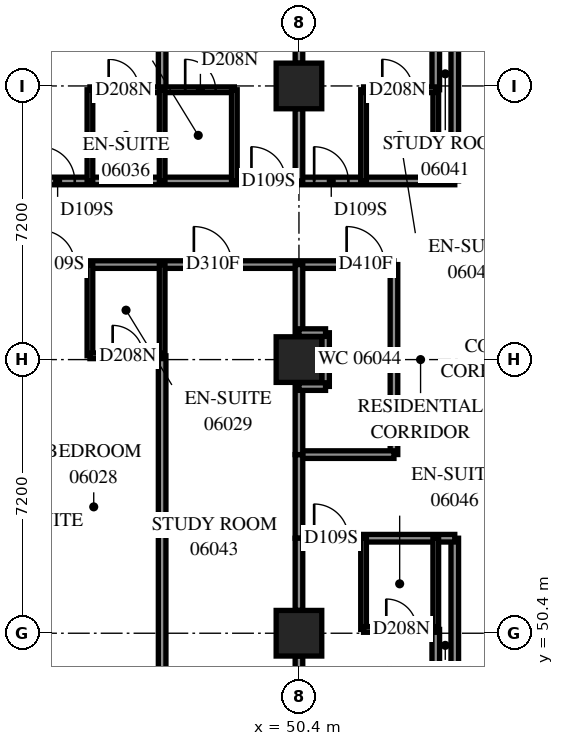
"""IFC4 building model, lengths in metres.
Left out: names, types, materials, properties, quantities, classifications, styles, units other than length and angle.
Written with IfcOpenShell. Run it as: python <this file> out.ifc"""

import sys

from ifc_helpers import new_model, si_unit, direction, frame, frame_2d, origin, origin_2d, place, context, subcontext, project, spatial, rectangle, extrude, element, fill, save


model = new_model("IFC4")
c1 = context("Model", 3, precision=1e-05, world=origin(), true_north=direction((0.0, 1.0)))
c2 = subcontext(c1, "Body", "Model", "MODEL_VIEW")
j1 = project(units=[si_unit("LENGTHUNIT", "METRE"), si_unit("PLANEANGLEUNIT", "RADIAN")], contexts=[c1])
p1 = place(None, origin())
s1 = spatial("IfcSite", under=j1, at=p1, CompositionType="ELEMENT")
p2 = place(p1, origin())
s2 = spatial("IfcBuilding", under=s1, at=p2, CompositionType="ELEMENT")
p3 = place(p2, frame((0.0, 0.0, 27.0)))
s3 = spatial("IfcBuildingStorey", under=s2, at=p3, CompositionType="ELEMENT", Elevation=27.0)
for number, where, z_axis, x_axis in (
    (1, (50.4, 50.4, 0.0), (0.0, 0.0, 1.0), (1.0, 0.0, 0.0)),
    (2, (50.4, 57.6, 0.0), (0.0, 0.0, 1.0), (1.0, 0.0, 0.0)),
    (3, (50.4, 64.8, 0.0), (0.0, 0.0, 1.0), (1.0, 0.0, 0.0)),
):
    element("IfcColumn", number, at=place(p3, frame(where, z_axis=z_axis, x_axis=x_axis)), inside=s3, PredefinedType="COLUMN", context=c2, shape_type="SweptSolid", body=[
        extrude(rectangle(XDim=1.2, YDim=1.2, at=origin_2d()), origin(), (0.0, 0.0, 1.0), 3.1),
    ])
p4 = place(p3, frame((28.8, 60.1, 0.0), z_axis=(0.0, 0.0, 1.0), x_axis=(1.0, 0.0, 0.0)))
e4 = element("IfcWall", 4, at=p4, inside=s3, PredefinedType="PARTITIONING", context=c2, shape_type="SweptSolid", body=[
    extrude(rectangle(XDim=24.1, YDim=0.2, at=frame_2d((12.05, 0.0))), origin(), (0.0, 0.0, 1.0), 3.1),
])
p5 = place(p4, frame((4.125, 0.0, 0.0)))
e5 = element("IfcOpeningElement", 5, at=p5, cuts=e4, PredefinedType="OPENING", context=c2, shape_type="SweptSolid", body=[
    extrude(rectangle(XDim=1.0, YDim=2.1, at=frame_2d((0.5, 1.05))), frame((0.0, 0.11, 0.0), z_axis=(0.0, -1.0, 0.0), x_axis=(1.0, 0.0, 0.0)), (0.0, 0.0, 1.0), 0.22),
])
p6 = place(p4, frame((11.62, 0.0, 0.0)))
e6 = element("IfcOpeningElement", 6, at=p6, cuts=e4, PredefinedType="OPENING", context=c2, shape_type="SweptSolid", body=[
    extrude(rectangle(XDim=0.9, YDim=2.1, at=frame_2d((0.45, 1.05))), frame((0.0, 0.11, 0.0), z_axis=(0.0, -1.0, 0.0), x_axis=(1.0, 0.0, 0.0)), (0.0, 0.0, 1.0), 0.22),
])
p7 = place(p4, frame((14.8, 0.0, 0.0)))
e7 = element("IfcOpeningElement", 7, at=p7, cuts=e4, PredefinedType="OPENING", context=c2, shape_type="SweptSolid", body=[
    extrude(rectangle(XDim=0.9, YDim=2.1, at=frame_2d((0.45, 1.05))), frame((0.0, 0.11, 0.0), z_axis=(0.0, -1.0, 0.0), x_axis=(1.0, 0.0, 0.0)), (0.0, 0.0, 1.0), 0.22),
])
p8 = place(p4, frame((18.835, 0.0, 0.0)))
e8 = element("IfcOpeningElement", 8, at=p8, cuts=e4, PredefinedType="OPENING", context=c2, shape_type="SweptSolid", body=[
    extrude(rectangle(XDim=1.0, YDim=2.1, at=frame_2d((0.5, 1.05))), frame((0.0, 0.11, 0.0), z_axis=(0.0, -1.0, 0.0), x_axis=(1.0, 0.0, 0.0)), (0.0, 0.0, 1.0), 0.22),
])
p9 = place(p4, frame((22.854, 0.0, 0.0)))
e9 = element("IfcOpeningElement", 9, at=p9, cuts=e4, PredefinedType="OPENING", context=c2, shape_type="SweptSolid", body=[
    extrude(rectangle(XDim=1.0, YDim=2.1, at=frame_2d((0.5, 1.05))), frame((0.0, 0.11, 0.0), z_axis=(0.0, -1.0, 0.0), x_axis=(1.0, 0.0, 0.0)), (0.0, 0.0, 1.0), 0.22),
])
p10 = place(p3, frame((33.502, 62.3, 0.0), z_axis=(0.0, 0.0, 1.0), x_axis=(1.0, 0.0, 0.0)))
e10 = element("IfcWall", 10, at=p10, inside=s3, PredefinedType="PARTITIONING", context=c2, shape_type="SweptSolid", body=[
    extrude(rectangle(XDim=20.998, YDim=0.2, at=frame_2d((10.499, 0.0))), origin(), (0.0, 0.0, 1.0), 3.1),
])
p11 = place(p10, frame((2.898, 0.0, 0.0)))
e11 = element("IfcOpeningElement", 11, at=p11, cuts=e10, PredefinedType="OPENING", context=c2, shape_type="SweptSolid", body=[
    extrude(rectangle(XDim=0.9, YDim=2.1, at=frame_2d((0.45, 1.05))), frame((0.0, 0.11, 0.0), z_axis=(0.0, -1.0, 0.0), x_axis=(1.0, 0.0, 0.0)), (0.0, 0.0, 1.0), 0.22),
])
p12 = place(p10, frame((8.448, 0.0, 0.0)))
e12 = element("IfcOpeningElement", 12, at=p12, cuts=e10, PredefinedType="OPENING", context=c2, shape_type="SweptSolid", body=[
    extrude(rectangle(XDim=0.9, YDim=2.1, at=frame_2d((0.45, 1.05))), frame((0.0, 0.11, 0.0), z_axis=(0.0, -1.0, 0.0), x_axis=(1.0, 0.0, 0.0)), (0.0, 0.0, 1.0), 0.22),
])
p13 = place(p10, frame((10.098, 0.0, 0.0)))
e13 = element("IfcOpeningElement", 13, at=p13, cuts=e10, PredefinedType="OPENING", context=c2, shape_type="SweptSolid", body=[
    extrude(rectangle(XDim=0.9, YDim=2.1, at=frame_2d((0.45, 1.05))), frame((0.0, 0.11, 0.0), z_axis=(0.0, -1.0, 0.0), x_axis=(1.0, 0.0, 0.0)), (0.0, 0.0, 1.0), 0.22),
])
p14 = place(p10, frame((15.648, 0.0, 0.0)))
e14 = element("IfcOpeningElement", 14, at=p14, cuts=e10, PredefinedType="OPENING", context=c2, shape_type="SweptSolid", body=[
    extrude(rectangle(XDim=0.9, YDim=2.1, at=frame_2d((0.45, 1.05))), frame((0.0, 0.11, 0.0), z_axis=(0.0, -1.0, 0.0), x_axis=(1.0, 0.0, 0.0)), (0.0, 0.0, 1.0), 0.22),
])
p15 = place(p10, frame((17.298, 0.0, 0.0)))
e15 = element("IfcOpeningElement", 15, at=p15, cuts=e10, PredefinedType="OPENING", context=c2, shape_type="SweptSolid", body=[
    extrude(rectangle(XDim=0.9, YDim=2.1, at=frame_2d((0.45, 1.05))), frame((0.0, 0.11, 0.0), z_axis=(0.0, -1.0, 0.0), x_axis=(1.0, 0.0, 0.0)), (0.0, 0.0, 1.0), 0.22),
])
p16 = place(p3, frame((46.8, 48.85, 0.0), z_axis=(0.0, 0.0, 1.0), x_axis=(0.0, 1.0, 0.0)))
e16 = element("IfcWall", 16, at=p16, inside=s3, PredefinedType="PARTITIONING", context=c2, shape_type="SweptSolid", body=[
    extrude(rectangle(XDim=8.85, YDim=0.2, at=frame_2d((4.425, 0.0))), origin(), (0.0, 0.0, 1.0), 3.1),
])
p17 = place(p3, frame((54.0, 42.431, 0.0), z_axis=(0.0, 0.0, 1.0), x_axis=(0.0, 1.0, 0.0)))
e17 = element("IfcWall", 17, at=p17, inside=s3, PredefinedType="PARTITIONING", context=c2, shape_type="SweptSolid", body=[
    extrude(rectangle(XDim=8.069, YDim=0.2, at=frame_2d((4.034, 0.0))), origin(), (0.0, 0.0, 1.0), 3.1),
])
p18 = place(p3, frame((46.8, 64.7, 0.0), z_axis=(0.0, 0.0, 1.0), x_axis=(0.0, 1.0, 0.0)))
e18 = element("IfcWall", 18, at=p18, inside=s3, PredefinedType="PARTITIONING", context=c2, shape_type="SweptSolid", body=[
    extrude(rectangle(XDim=8.012, YDim=0.2, at=frame_2d((4.006, 0.0))), origin(), (0.0, 0.0, 1.0), 3.1),
])
p19 = place(p3, frame((54.0, 64.7, 0.0), z_axis=(0.0, 0.0, 1.0), x_axis=(0.0, 1.0, 0.0)))
e19 = element("IfcWall", 19, at=p19, inside=s3, PredefinedType="PARTITIONING", context=c2, shape_type="SweptSolid", body=[
    extrude(rectangle(XDim=7.982, YDim=0.2, at=frame_2d((3.991, 0.0))), origin(), (0.0, 0.0, 1.0), 3.1),
])
p20 = place(p3, frame((50.4, 43.8, 0.0), z_axis=(0.0, 0.0, 1.0), x_axis=(0.0, 1.0, 0.0)))
e20 = element("IfcWall", 20, at=p20, inside=s3, PredefinedType="PARTITIONING", context=c2, shape_type="SweptSolid", body=[
    extrude(rectangle(XDim=6.0, YDim=0.2, at=frame_2d((3.0, 0.0))), origin(), (0.0, 0.0, 1.0), 2.6),
])
p21 = place(p3, frame((50.4, 65.4, 0.0), z_axis=(0.0, 0.0, 1.0), x_axis=(0.0, 1.0, 0.0)))
e21 = element("IfcWall", 21, at=p21, inside=s3, PredefinedType="PARTITIONING", context=c2, shape_type="SweptSolid", body=[
    extrude(rectangle(XDim=6.0, YDim=0.2, at=frame_2d((3.0, 0.0))), origin(), (0.0, 0.0, 1.0), 3.1),
])
p22 = place(p3, frame((54.5, 47.3, 0.0), z_axis=(0.0, 0.0, 1.0), x_axis=(0.0, 1.0, 0.0)))
e22 = element("IfcWall", 22, at=p22, inside=s3, PredefinedType="PARTITIONING", context=c2, shape_type="SweptSolid", body=[
    extrude(rectangle(XDim=5.6, YDim=0.2, at=frame_2d((2.8, 0.0))), origin(), (0.0, 0.0, 1.0), 3.1),
])
p23 = place(p3, frame((54.5, 62.302, 0.0), z_axis=(0.0, 0.0, 1.0), x_axis=(0.0, 1.0, 0.0)))
e23 = element("IfcWall", 23, at=p23, inside=s3, PredefinedType="PARTITIONING", context=c2, shape_type="SweptSolid", body=[
    extrude(rectangle(XDim=5.598, YDim=0.2, at=frame_2d((2.799, 0.0))), origin(), (0.0, 0.0, 1.0), 3.1),
])
p24 = place(p3, frame((52.9, 55.102, 0.0), z_axis=(0.0, 0.0, 1.0), x_axis=(0.0, 1.0, 0.0)))
e24 = element("IfcWall", 24, at=p24, inside=s3, PredefinedType="PARTITIONING", context=c2, shape_type="SweptSolid", body=[
    extrude(rectangle(XDim=4.998, YDim=0.2, at=frame_2d((2.499, 0.0))), origin(), (0.0, 0.0, 1.0), 3.1),
])
p25 = place(p3, frame((50.4, 52.9, 0.0), z_axis=(0.0, 0.0, 1.0), x_axis=(1.0, 0.0, 0.0)))
e25 = element("IfcWall", 25, at=p25, inside=s3, PredefinedType="PARTITIONING", context=c2, shape_type="SweptSolid", body=[
    extrude(rectangle(XDim=4.1, YDim=0.2, at=frame_2d((2.05, 0.0))), origin(), (0.0, 0.0, 1.0), 3.1),
])
p26 = place(p25, frame((0.4, 0.0, 0.0)))
e26 = element("IfcOpeningElement", 26, at=p26, cuts=e25, PredefinedType="OPENING", context=c2, shape_type="SweptSolid", body=[
    extrude(rectangle(XDim=0.9, YDim=2.1, at=frame_2d((0.45, 1.05))), frame((0.0, 0.11, 0.0), z_axis=(0.0, -1.0, 0.0), x_axis=(1.0, 0.0, 0.0)), (0.0, 0.0, 1.0), 0.22),
])
p27 = place(p3, frame((44.9, 64.7, 0.0), z_axis=(0.0, 0.0, 1.0), x_axis=(1.0, 0.0, 0.0)))
e27 = element("IfcWall", 27, at=p27, inside=s3, PredefinedType="PARTITIONING", context=c2, shape_type="SweptSolid", body=[
    extrude(rectangle(XDim=3.8, YDim=0.15, at=frame_2d((1.9, 0.0))), origin(), (0.0, 0.0, 1.0), 3.1),
])
p28 = place(p27, frame((0.493, 0.0, 0.0)))
e28 = element("IfcOpeningElement", 28, at=p28, cuts=e27, PredefinedType="OPENING", context=c2, shape_type="SweptSolid", body=[
    extrude(rectangle(XDim=0.8, YDim=2.1, at=frame_2d((0.4, 1.05))), frame((0.0, 0.085, 0.0), z_axis=(0.0, -1.0, 0.0), x_axis=(1.0, 0.0, 0.0)), (0.0, 0.0, 1.0), 0.17),
])
p29 = place(p27, frame((2.507, 0.0, 0.0)))
e29 = element("IfcOpeningElement", 29, at=p29, cuts=e27, PredefinedType="OPENING", context=c2, shape_type="SweptSolid", body=[
    extrude(rectangle(XDim=0.8, YDim=2.1, at=frame_2d((0.4, 1.05))), frame((0.0, 0.085, 0.0), z_axis=(0.0, -1.0, 0.0), x_axis=(1.0, 0.0, 0.0)), (0.0, 0.0, 1.0), 0.17),
])
p30 = place(p3, frame((50.4, 55.1, 0.0), z_axis=(0.0, 0.0, 1.0), x_axis=(1.0, 0.0, 0.0)))
e30 = element("IfcWall", 30, at=p30, inside=s3, PredefinedType="PARTITIONING", context=c2, shape_type="SweptSolid", body=[
    extrude(rectangle(XDim=2.5, YDim=0.2, at=frame_2d((1.25, 0.0))), origin(), (0.0, 0.0, 1.0), 3.1),
])
for number, where, z_axis, x_axis in (
    (31, (44.9, 62.3, 0.0), (0.0, 0.0, 1.0), (0.0, 1.0, 0.0)),
    (32, (46.8, 62.3, 0.0), (0.0, 0.0, 1.0), (0.0, 1.0, 0.0)),
    (33, (48.7, 62.3, 0.0), (0.0, 0.0, 1.0), (0.0, 1.0, 0.0)),
    (34, (52.1, 62.3, 0.0), (0.0, 0.0, 1.0), (0.0, 1.0, 0.0)),
    (35, (54.0, 62.3, 0.0), (0.0, 0.0, 1.0), (0.0, 1.0, 0.0)),
    (36, (44.9, 57.7, 0.0), (0.0, 0.0, 1.0), (0.0, 1.0, 0.0)),
    (37, (46.8, 57.7, 0.0), (0.0, 0.0, 1.0), (0.0, 1.0, 0.0)),
    (38, (52.1, 50.5, 0.0), (0.0, 0.0, 1.0), (0.0, 1.0, 0.0)),
    (39, (54.0, 50.5, 0.0), (0.0, 0.0, 1.0), (0.0, 1.0, 0.0)),
):
    element("IfcWall", number, at=place(p3, frame(where, z_axis=z_axis, x_axis=x_axis)), inside=s3, PredefinedType="PARTITIONING", context=c2, shape_type="SweptSolid", body=[
        extrude(rectangle(XDim=2.4, YDim=0.15, at=frame_2d((1.2, 0.0))), origin(), (0.0, 0.0, 1.0), 3.1),
    ])
p31 = place(p3, frame((50.4, 52.9, 0.0), z_axis=(0.0, 0.0, 1.0), x_axis=(0.0, 1.0, 0.0)))
e40 = element("IfcWall", 40, at=p31, inside=s3, PredefinedType="PARTITIONING", context=c2, shape_type="SweptSolid", body=[
    extrude(rectangle(XDim=2.2, YDim=0.2, at=frame_2d((1.1, 0.0))), origin(), (0.0, 0.0, 1.0), 3.1),
])
p32 = place(p3, frame((50.4, 62.3, 0.0), z_axis=(0.0, 0.0, 1.0), x_axis=(0.0, 1.0, 0.0)))
e41 = element("IfcWall", 41, at=p32, inside=s3, PredefinedType="PARTITIONING", context=c2, shape_type="SweptSolid", body=[
    extrude(rectangle(XDim=1.9, YDim=0.2, at=frame_2d((0.95, 0.0))), origin(), (0.0, 0.0, 1.0), 3.1),
])
p33 = place(p3, frame((44.9, 57.7, 0.0), z_axis=(0.0, 0.0, 1.0), x_axis=(1.0, 0.0, 0.0)))
e42 = element("IfcWall", 42, at=p33, inside=s3, PredefinedType="PARTITIONING", context=c2, shape_type="SweptSolid", body=[
    extrude(rectangle(XDim=1.9, YDim=0.15, at=frame_2d((0.95, 0.0))), origin(), (0.0, 0.0, 1.0), 3.1),
])
p34 = place(p33, frame((0.598, 0.0, 0.0)))
e43 = element("IfcOpeningElement", 43, at=p34, cuts=e42, PredefinedType="OPENING", context=c2, shape_type="SweptSolid", body=[
    extrude(rectangle(XDim=0.8, YDim=2.1, at=frame_2d((0.4, 1.05))), frame((0.0, 0.085, 0.0), z_axis=(0.0, -1.0, 0.0), x_axis=(1.0, 0.0, 0.0)), (0.0, 0.0, 1.0), 0.17),
])
p35 = place(p3, frame((52.1, 64.7, 0.0), z_axis=(0.0, 0.0, 1.0), x_axis=(1.0, 0.0, 0.0)))
e44 = element("IfcWall", 44, at=p35, inside=s3, PredefinedType="PARTITIONING", context=c2, shape_type="SweptSolid", body=[
    extrude(rectangle(XDim=1.9, YDim=0.15, at=frame_2d((0.95, 0.0))), origin(), (0.0, 0.0, 1.0), 3.1),
])
p36 = place(p35, frame((0.493, 0.0, 0.0)))
e45 = element("IfcOpeningElement", 45, at=p36, cuts=e44, PredefinedType="OPENING", context=c2, shape_type="SweptSolid", body=[
    extrude(rectangle(XDim=0.8, YDim=2.1, at=frame_2d((0.4, 1.05))), frame((0.0, 0.085, 0.0), z_axis=(0.0, -1.0, 0.0), x_axis=(1.0, 0.0, 0.0)), (0.0, 0.0, 1.0), 0.17),
])
p37 = place(p3, frame((50.4, 51.0, 0.0), z_axis=(0.0, 0.0, 1.0), x_axis=(0.0, 1.0, 0.0)))
e46 = element("IfcWall", 46, at=p37, inside=s3, PredefinedType="PARTITIONING", context=c2, shape_type="SweptSolid", body=[
    extrude(rectangle(XDim=1.9, YDim=0.2, at=frame_2d((0.95, 0.0))), origin(), (0.0, 0.0, 1.0), 3.1),
])
p38 = place(p3, frame((52.1, 50.5, 0.0), z_axis=(0.0, 0.0, 1.0), x_axis=(1.0, 0.0, 0.0)))
e47 = element("IfcWall", 47, at=p38, inside=s3, PredefinedType="PARTITIONING", context=c2, shape_type="SweptSolid", body=[
    extrude(rectangle(XDim=1.9, YDim=0.15, at=frame_2d((0.95, 0.0))), origin(), (0.0, 0.0, 1.0), 3.1),
])
p39 = place(p38, frame((0.598, 0.0, 0.0)))
e48 = element("IfcOpeningElement", 48, at=p39, cuts=e47, PredefinedType="OPENING", context=c2, shape_type="SweptSolid", body=[
    extrude(rectangle(XDim=0.8, YDim=2.1, at=frame_2d((0.4, 1.05))), frame((0.0, 0.085, 0.0), z_axis=(0.0, -1.0, 0.0), x_axis=(1.0, 0.0, 0.0)), (0.0, 0.0, 1.0), 0.17),
])
for number, where, z_axis, x_axis in (
    (49, (50.4, 58.306, 0.0), (0.0, 0.0, 1.0), (0.0, 1.0, 0.0)),
    (50, (50.4, 55.1, 0.0), (0.0, 0.0, 1.0), (0.0, 1.0, 0.0)),
):
    element("IfcWall", number, at=place(p3, frame(where, z_axis=z_axis, x_axis=x_axis)), inside=s3, PredefinedType="PARTITIONING", context=c2, shape_type="SweptSolid", body=[
        extrude(rectangle(XDim=1.794, YDim=0.2, at=frame_2d((0.897, 0.0))), origin(), (0.0, 0.0, 1.0), 3.1),
    ])
p40 = place(p3, frame((51.1, 56.894, 0.0), z_axis=(0.0, 0.0, 1.0), x_axis=(0.0, 1.0, 0.0)))
e51 = element("IfcWall", 51, at=p40, inside=s3, PredefinedType="PARTITIONING", context=c2, shape_type="SweptSolid", body=[
    extrude(rectangle(XDim=1.412, YDim=0.2, at=frame_2d((0.706, 0.0))), origin(), (0.0, 0.0, 1.0), 3.1),
])
for number, where, z_axis, x_axis in (
    (52, (50.4, 58.31, 0.0), (0.0, 0.0, 1.0), (1.0, 0.0, 0.0)),
    (53, (50.4, 56.89, 0.0), (0.0, 0.0, 1.0), (1.0, 0.0, 0.0)),
):
    element("IfcWall", number, at=place(p3, frame(where, z_axis=z_axis, x_axis=x_axis)), inside=s3, PredefinedType="PARTITIONING", context=c2, shape_type="SweptSolid", body=[
        extrude(rectangle(XDim=0.7, YDim=0.2, at=frame_2d((0.35, 0.0))), origin(), (0.0, 0.0, 1.0), 3.1),
    ])
p41 = place(p7, origin())
e54 = element("IfcDoor", 54, at=p41, inside=s3, OperationType="SINGLE_SWING_LEFT", PredefinedType="DOOR", context=c2, shape_type="SweptSolid", body=[
    extrude(rectangle(XDim=0.9, YDim=2.1, at=frame_2d((0.45, 1.05))), frame((0.0, 0.025, 0.0), z_axis=(0.0, -1.0, 0.0), x_axis=(1.0, 0.0, 0.0)), (0.0, 0.0, 1.0), 0.05),
])
fill(e7, e54)
p42 = place(p34, origin())
e55 = element("IfcDoor", 55, at=p42, inside=s3, OperationType="SINGLE_SWING_RIGHT", PredefinedType="DOOR", context=c2, shape_type="SweptSolid", body=[
    extrude(rectangle(XDim=0.8, YDim=2.1, at=frame_2d((0.4, 1.05))), frame((0.0, 0.025, 0.0), z_axis=(0.0, -1.0, 0.0), x_axis=(1.0, 0.0, 0.0)), (0.0, 0.0, 1.0), 0.05),
])
fill(e43, e55)
p43 = place(p13, origin())
e56 = element("IfcDoor", 56, at=p43, inside=s3, OperationType="SINGLE_SWING_RIGHT", PredefinedType="DOOR", context=c2, shape_type="SweptSolid", body=[
    extrude(rectangle(XDim=0.9, YDim=2.1, at=frame_2d((0.45, 1.05))), frame((0.0, 0.025, 0.0), z_axis=(0.0, -1.0, 0.0), x_axis=(1.0, 0.0, 0.0)), (0.0, 0.0, 1.0), 0.05),
])
fill(e13, e56)
p44 = place(p28, origin())
e57 = element("IfcDoor", 57, at=p44, inside=s3, OperationType="SINGLE_SWING_RIGHT", PredefinedType="DOOR", context=c2, shape_type="SweptSolid", body=[
    extrude(rectangle(XDim=0.8, YDim=2.1, at=frame_2d((0.4, 1.05))), frame((0.0, 0.025, 0.0), z_axis=(0.0, -1.0, 0.0), x_axis=(1.0, 0.0, 0.0)), (0.0, 0.0, 1.0), 0.05),
])
fill(e28, e57)
p45 = place(p14, origin())
e58 = element("IfcDoor", 58, at=p45, inside=s3, OperationType="SINGLE_SWING_LEFT", PredefinedType="DOOR", context=c2, shape_type="SweptSolid", body=[
    extrude(rectangle(XDim=0.9, YDim=2.1, at=frame_2d((0.45, 1.05))), frame((0.0, 0.025, 0.0), z_axis=(0.0, -1.0, 0.0), x_axis=(1.0, 0.0, 0.0)), (0.0, 0.0, 1.0), 0.05),
])
fill(e14, e58)
p46 = place(p29, origin())
e59 = element("IfcDoor", 59, at=p46, inside=s3, OperationType="SINGLE_SWING_RIGHT", PredefinedType="DOOR", context=c2, shape_type="SweptSolid", body=[
    extrude(rectangle(XDim=0.8, YDim=2.1, at=frame_2d((0.4, 1.05))), frame((0.0, 0.025, 0.0), z_axis=(0.0, -1.0, 0.0), x_axis=(1.0, 0.0, 0.0)), (0.0, 0.0, 1.0), 0.05),
])
fill(e29, e59)
p47 = place(p15, origin())
e60 = element("IfcDoor", 60, at=p47, inside=s3, OperationType="SINGLE_SWING_RIGHT", PredefinedType="DOOR", context=c2, shape_type="SweptSolid", body=[
    extrude(rectangle(XDim=0.9, YDim=2.1, at=frame_2d((0.45, 1.05))), frame((0.0, 0.025, 0.0), z_axis=(0.0, -1.0, 0.0), x_axis=(1.0, 0.0, 0.0)), (0.0, 0.0, 1.0), 0.05),
])
fill(e15, e60)
p48 = place(p36, origin())
e61 = element("IfcDoor", 61, at=p48, inside=s3, OperationType="SINGLE_SWING_RIGHT", PredefinedType="DOOR", context=c2, shape_type="SweptSolid", body=[
    extrude(rectangle(XDim=0.8, YDim=2.1, at=frame_2d((0.4, 1.05))), frame((0.0, 0.025, 0.0), z_axis=(0.0, -1.0, 0.0), x_axis=(1.0, 0.0, 0.0)), (0.0, 0.0, 1.0), 0.05),
])
fill(e45, e61)
p49 = place(p8, origin())
e62 = element("IfcDoor", 62, at=p49, inside=s3, OperationType="SINGLE_SWING_RIGHT", PredefinedType="DOOR", context=c2, shape_type="SweptSolid", body=[
    extrude(rectangle(XDim=1.0, YDim=2.1, at=frame_2d((0.5, 1.05))), frame((0.0, 0.025, 0.0), z_axis=(0.0, -1.0, 0.0), x_axis=(1.0, 0.0, 0.0)), (0.0, 0.0, 1.0), 0.05),
])
fill(e8, e62)
p50 = place(p9, origin())
e63 = element("IfcDoor", 63, at=p50, inside=s3, OperationType="SINGLE_SWING_LEFT", PredefinedType="DOOR", context=c2, shape_type="SweptSolid", body=[
    extrude(rectangle(XDim=1.0, YDim=2.1, at=frame_2d((0.5, 1.05))), frame((0.0, 0.025, 0.0), z_axis=(0.0, -1.0, 0.0), x_axis=(1.0, 0.0, 0.0)), (0.0, 0.0, 1.0), 0.05),
])
fill(e9, e63)
p51 = place(p26, origin())
e64 = element("IfcDoor", 64, at=p51, inside=s3, OperationType="SINGLE_SWING_LEFT", PredefinedType="DOOR", context=c2, shape_type="SweptSolid", body=[
    extrude(rectangle(XDim=0.9, YDim=2.1, at=frame_2d((0.45, 1.05))), frame((0.0, 0.025, 0.0), z_axis=(0.0, -1.0, 0.0), x_axis=(1.0, 0.0, 0.0)), (0.0, 0.0, 1.0), 0.05),
])
fill(e26, e64)
p52 = place(p39, origin())
e65 = element("IfcDoor", 65, at=p52, inside=s3, OperationType="SINGLE_SWING_RIGHT", PredefinedType="DOOR", context=c2, shape_type="SweptSolid", body=[
    extrude(rectangle(XDim=0.8, YDim=2.1, at=frame_2d((0.4, 1.05))), frame((0.0, 0.025, 0.0), z_axis=(0.0, -1.0, 0.0), x_axis=(1.0, 0.0, 0.0)), (0.0, 0.0, 1.0), 0.05),
])
fill(e48, e65)
save(model, sys.argv[1])
